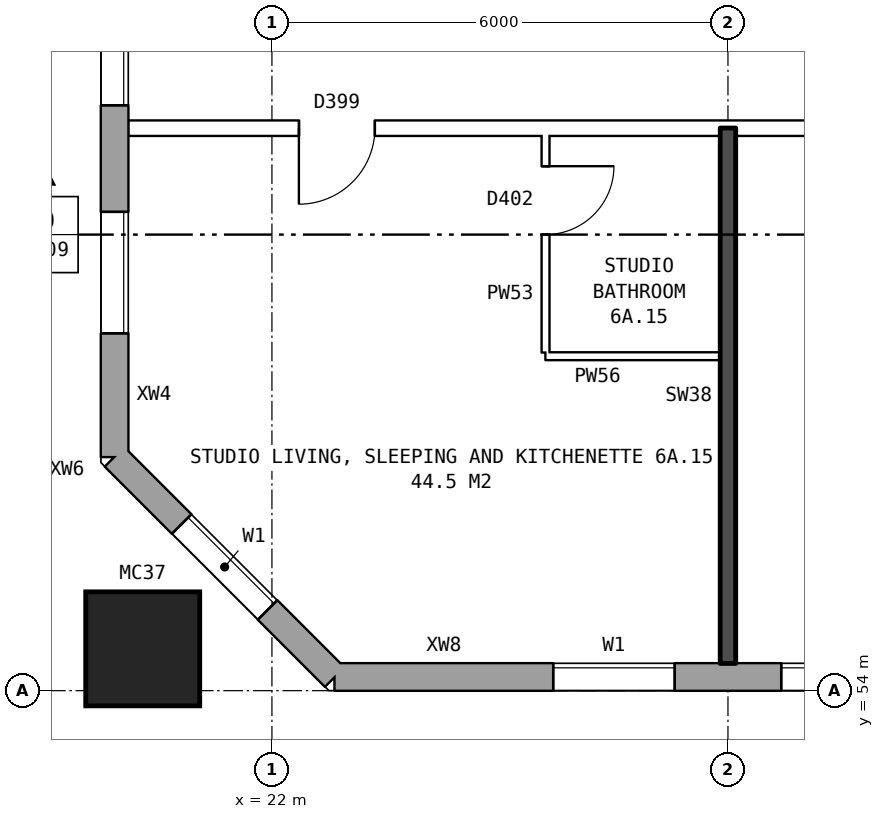
"""IFC4 building model, lengths in metres.
Left out: names, types, materials, properties, quantities, classifications, styles, units other than length and angle.
Written with IfcOpenShell. Run it as: python <this file> out.ifc"""

import sys

from ifc_helpers import new_model, si_unit, direction, frame, frame_2d, origin, origin_2d, place, context, subcontext, project, spatial, rectangle, hollow_rectangle, extrude, element, fill, save


model = new_model("IFC4")
c1 = context("Model", 3, precision=1e-05, world=origin(), true_north=direction((0.0, 1.0)))
c2 = subcontext(c1, "Body", "Model", "MODEL_VIEW")
j1 = project(units=[si_unit("LENGTHUNIT", "METRE"), si_unit("PLANEANGLEUNIT", "RADIAN")], contexts=[c1])
p1 = place(None, origin())
s1 = spatial("IfcSite", under=j1, at=p1, CompositionType="ELEMENT")
p2 = place(p1, origin())
s2 = spatial("IfcBuilding", under=s1, at=p2, CompositionType="ELEMENT")
p3 = place(p2, frame((0.0, 0.0, 25.7)))
s3 = spatial("IfcBuildingStorey", under=s2, at=p3, CompositionType="ELEMENT", Elevation=25.7)
p4 = place(p3, frame((20.3, 54.55, 0.0), z_axis=(0.0, 0.0, 1.0), x_axis=(1.0, 0.0, 0.0)))
e1 = element("IfcColumn", 1, at=p4, inside=s3, PredefinedType="COLUMN", context=c2, shape_type="SweptSolid", body=[
    extrude(hollow_rectangle(XDim=1.5, YDim=1.5, WallThickness=0.08, at=origin_2d()), origin(), (0.0, 0.0, 1.0), 3.1),
])
p5 = place(p3, frame((19.93, 57.075, 0.0), z_axis=(0.0, 0.0, 1.0), x_axis=(0.707106781187, -0.707106781187, 0.0)))
e2 = element("IfcWall", 2, at=p5, inside=s3, PredefinedType="STANDARD", context=c2, shape_type="SweptSolid", body=[
    extrude(rectangle(XDim=4.094, YDim=0.36, at=frame_2d((2.047, 0.0))), origin(), (0.0, 0.0, 1.0), 2.85),
])
p6 = place(p5, frame((1.247, 0.0, 0.8)))
e3 = element("IfcOpeningElement", 3, at=p6, cuts=e2, PredefinedType="OPENING", context=c2, shape_type="SweptSolid", body=[
    extrude(rectangle(XDim=1.6, YDim=1.8, at=frame_2d((0.8, 0.9))), frame((0.0, 0.19, 0.0), z_axis=(0.0, -1.0, 0.0), x_axis=(1.0, 0.0, 0.0)), (0.0, 0.0, 1.0), 0.38),
])
p7 = place(p3, frame((22.825, 54.18, 0.0), z_axis=(0.0, 0.0, 1.0), x_axis=(1.0, 0.0, 0.0)))
e4 = element("IfcWall", 4, at=p7, inside=s3, PredefinedType="STANDARD", context=c2, shape_type="SweptSolid", body=[
    extrude(rectangle(XDim=50.101, YDim=0.36, at=frame_2d((25.05, 0.0))), origin(), (0.0, 0.0, 1.0), 2.85),
])
p8 = place(p7, frame((2.875, 0.0, 0.8)))
e5 = element("IfcOpeningElement", 5, at=p8, cuts=e4, PredefinedType="OPENING", context=c2, shape_type="SweptSolid", body=[
    extrude(rectangle(XDim=1.6, YDim=1.8, at=frame_2d((0.8, 0.9))), frame((0.0, 0.19, 0.0), z_axis=(0.0, -1.0, 0.0), x_axis=(1.0, 0.0, 0.0)), (0.0, 0.0, 1.0), 0.38),
])
p9 = place(p7, frame((5.875, 0.0, 0.8)))
e6 = element("IfcOpeningElement", 6, at=p9, cuts=e4, PredefinedType="OPENING", context=c2, shape_type="SweptSolid", body=[
    extrude(rectangle(XDim=1.6, YDim=1.8, at=frame_2d((0.8, 0.9))), frame((0.0, 0.19, 0.0), z_axis=(0.0, -1.0, 0.0), x_axis=(1.0, 0.0, 0.0)), (0.0, 0.0, 1.0), 0.38),
])
p10 = place(p7, frame((7.775, 0.0, 1.6)))
e7 = element("IfcOpeningElement", 7, at=p10, cuts=e4, PredefinedType="OPENING", context=c2, shape_type="SweptSolid", body=[
    extrude(rectangle(XDim=0.8, YDim=0.9, at=frame_2d((0.4, 0.45))), frame((0.0, 0.19, 0.0), z_axis=(0.0, -1.0, 0.0), x_axis=(1.0, 0.0, 0.0)), (0.0, 0.0, 1.0), 0.38),
])
p11 = place(p7, frame((11.875, 0.0, 0.8)))
e8 = element("IfcOpeningElement", 8, at=p11, cuts=e4, PredefinedType="OPENING", context=c2, shape_type="SweptSolid", body=[
    extrude(rectangle(XDim=1.6, YDim=1.8, at=frame_2d((0.8, 0.9))), frame((0.0, 0.19, 0.0), z_axis=(0.0, -1.0, 0.0), x_axis=(1.0, 0.0, 0.0)), (0.0, 0.0, 1.0), 0.38),
])
p12 = place(p7, frame((14.875, 0.0, 0.8)))
e9 = element("IfcOpeningElement", 9, at=p12, cuts=e4, PredefinedType="OPENING", context=c2, shape_type="SweptSolid", body=[
    extrude(rectangle(XDim=1.6, YDim=1.8, at=frame_2d((0.8, 0.9))), frame((0.0, 0.19, 0.0), z_axis=(0.0, -1.0, 0.0), x_axis=(1.0, 0.0, 0.0)), (0.0, 0.0, 1.0), 0.38),
])
p13 = place(p7, frame((17.875, 0.0, 0.8)))
e10 = element("IfcOpeningElement", 10, at=p13, cuts=e4, PredefinedType="OPENING", context=c2, shape_type="SweptSolid", body=[
    extrude(rectangle(XDim=1.6, YDim=1.8, at=frame_2d((0.8, 0.9))), frame((0.0, 0.19, 0.0), z_axis=(0.0, -1.0, 0.0), x_axis=(1.0, 0.0, 0.0)), (0.0, 0.0, 1.0), 0.38),
])
p14 = place(p7, frame((20.875, 0.0, 0.8)))
e11 = element("IfcOpeningElement", 11, at=p14, cuts=e4, PredefinedType="OPENING", context=c2, shape_type="SweptSolid", body=[
    extrude(rectangle(XDim=1.6, YDim=1.8, at=frame_2d((0.8, 0.9))), frame((0.0, 0.19, 0.0), z_axis=(0.0, -1.0, 0.0), x_axis=(1.0, 0.0, 0.0)), (0.0, 0.0, 1.0), 0.38),
])
p15 = place(p7, frame((23.875, 0.0, 0.8)))
e12 = element("IfcOpeningElement", 12, at=p15, cuts=e4, PredefinedType="OPENING", context=c2, shape_type="SweptSolid", body=[
    extrude(rectangle(XDim=1.6, YDim=1.8, at=frame_2d((0.8, 0.9))), frame((0.0, 0.19, 0.0), z_axis=(0.0, -1.0, 0.0), x_axis=(1.0, 0.0, 0.0)), (0.0, 0.0, 1.0), 0.38),
])
p16 = place(p7, frame((26.875, 0.0, 0.8)))
e13 = element("IfcOpeningElement", 13, at=p16, cuts=e4, PredefinedType="OPENING", context=c2, shape_type="SweptSolid", body=[
    extrude(rectangle(XDim=1.6, YDim=1.8, at=frame_2d((0.8, 0.9))), frame((0.0, 0.19, 0.0), z_axis=(0.0, -1.0, 0.0), x_axis=(1.0, 0.0, 0.0)), (0.0, 0.0, 1.0), 0.38),
])
p17 = place(p7, frame((29.875, 0.0, 0.8)))
e14 = element("IfcOpeningElement", 14, at=p17, cuts=e4, PredefinedType="OPENING", context=c2, shape_type="SweptSolid", body=[
    extrude(rectangle(XDim=1.6, YDim=1.8, at=frame_2d((0.8, 0.9))), frame((0.0, 0.19, 0.0), z_axis=(0.0, -1.0, 0.0), x_axis=(1.0, 0.0, 0.0)), (0.0, 0.0, 1.0), 0.38),
])
p18 = place(p7, frame((32.875, 0.0, 0.8)))
e15 = element("IfcOpeningElement", 15, at=p18, cuts=e4, PredefinedType="OPENING", context=c2, shape_type="SweptSolid", body=[
    extrude(rectangle(XDim=1.6, YDim=1.8, at=frame_2d((0.8, 0.9))), frame((0.0, 0.19, 0.0), z_axis=(0.0, -1.0, 0.0), x_axis=(1.0, 0.0, 0.0)), (0.0, 0.0, 1.0), 0.38),
])
p19 = place(p7, frame((35.875, 0.0, 0.8)))
e16 = element("IfcOpeningElement", 16, at=p19, cuts=e4, PredefinedType="OPENING", context=c2, shape_type="SweptSolid", body=[
    extrude(rectangle(XDim=1.6, YDim=1.8, at=frame_2d((0.8, 0.9))), frame((0.0, 0.19, 0.0), z_axis=(0.0, -1.0, 0.0), x_axis=(1.0, 0.0, 0.0)), (0.0, 0.0, 1.0), 0.38),
])
p20 = place(p7, frame((38.325, 0.0, 0.15)))
e17 = element("IfcOpeningElement", 17, at=p20, cuts=e4, PredefinedType="OPENING", context=c2, shape_type="SweptSolid", body=[
    extrude(rectangle(XDim=1.2, YDim=1.8, at=frame_2d((0.6, 0.9))), frame((0.0, 0.19, 0.0), z_axis=(0.0, -1.0, 0.0), x_axis=(1.0, 0.0, 0.0)), (0.0, 0.0, 1.0), 0.38),
])
p21 = place(p7, frame((41.825, 0.0, 1.4)))
e18 = element("IfcOpeningElement", 18, at=p21, cuts=e4, PredefinedType="OPENING", context=c2, shape_type="SweptSolid", body=[
    extrude(rectangle(XDim=1.0, YDim=1.2, at=frame_2d((0.5, 0.6))), frame((0.0, 0.19, 0.0), z_axis=(0.0, -1.0, 0.0), x_axis=(1.0, 0.0, 0.0)), (0.0, 0.0, 1.0), 0.38),
])
p22 = place(p7, frame((44.875, 0.0, 0.8)))
e19 = element("IfcOpeningElement", 19, at=p22, cuts=e4, PredefinedType="OPENING", context=c2, shape_type="SweptSolid", body=[
    extrude(rectangle(XDim=1.6, YDim=1.8, at=frame_2d((0.8, 0.9))), frame((0.0, 0.19, 0.0), z_axis=(0.0, -1.0, 0.0), x_axis=(1.0, 0.0, 0.0)), (0.0, 0.0, 1.0), 0.38),
])
p23 = place(p7, frame((47.875, 0.0, 0.8)))
e20 = element("IfcOpeningElement", 20, at=p23, cuts=e4, PredefinedType="OPENING", context=c2, shape_type="SweptSolid", body=[
    extrude(rectangle(XDim=1.6, YDim=1.8, at=frame_2d((0.8, 0.9))), frame((0.0, 0.19, 0.0), z_axis=(0.0, -1.0, 0.0), x_axis=(1.0, 0.0, 0.0)), (0.0, 0.0, 1.0), 0.38),
])
p24 = place(p7, frame((10.175, 0.0, 0.8)))
e21 = element("IfcOpeningElement", 21, at=p24, cuts=e4, PredefinedType="OPENING", context=c2, shape_type="SweptSolid", body=[
    extrude(rectangle(XDim=0.8, YDim=0.9, at=frame_2d((0.4, 0.45))), frame((0.0, 0.19, 0.0), z_axis=(0.0, -1.0, 0.0), x_axis=(1.0, 0.0, 0.0)), (0.0, 0.0, 1.0), 0.38),
])
p25 = place(p7, frame((39.825, 0.0, 0.15)))
e22 = element("IfcOpeningElement", 22, at=p25, cuts=e4, PredefinedType="OPENING", context=c2, shape_type="SweptSolid", body=[
    extrude(rectangle(XDim=1.0, YDim=0.9, at=frame_2d((0.5, 0.45))), frame((0.0, 0.19, 0.0), z_axis=(0.0, -1.0, 0.0), x_axis=(1.0, 0.0, 0.0)), (0.0, 0.0, 1.0), 0.38),
])
p26 = place(p7, frame((43.125, 0.0, 0.8)))
e23 = element("IfcOpeningElement", 23, at=p26, cuts=e4, PredefinedType="OPENING", context=c2, shape_type="SweptSolid", body=[
    extrude(rectangle(XDim=1.4, YDim=1.8, at=frame_2d((0.7, 0.9))), frame((0.0, 0.19, 0.0), z_axis=(0.0, -1.0, 0.0), x_axis=(1.0, 0.0, 0.0)), (0.0, 0.0, 1.0), 0.38),
])
p27 = place(p3, frame((19.93, 82.925, 0.0), z_axis=(0.0, 0.0, 1.0), x_axis=(0.0, -1.0, 0.0)))
e24 = element("IfcWall", 24, at=p27, inside=s3, PredefinedType="STANDARD", context=c2, shape_type="SweptSolid", body=[
    extrude(rectangle(XDim=25.851, YDim=0.36, at=frame_2d((12.925, 0.0))), origin(), (0.0, 0.0, 1.0), 2.85),
])
p28 = place(p27, frame((1.625, 0.0, 0.8)))
e25 = element("IfcOpeningElement", 25, at=p28, cuts=e24, PredefinedType="OPENING", context=c2, shape_type="SweptSolid", body=[
    extrude(rectangle(XDim=1.6, YDim=1.8, at=frame_2d((0.8, 0.9))), frame((0.0, 0.19, 0.0), z_axis=(0.0, -1.0, 0.0), x_axis=(1.0, 0.0, 0.0)), (0.0, 0.0, 1.0), 0.38),
])
p29 = place(p27, frame((4.625, 0.0, 0.8)))
e26 = element("IfcOpeningElement", 26, at=p29, cuts=e24, PredefinedType="OPENING", context=c2, shape_type="SweptSolid", body=[
    extrude(rectangle(XDim=1.6, YDim=1.8, at=frame_2d((0.8, 0.9))), frame((0.0, 0.19, 0.0), z_axis=(0.0, -1.0, 0.0), x_axis=(1.0, 0.0, 0.0)), (0.0, 0.0, 1.0), 0.38),
])
p30 = place(p27, frame((6.525, 0.0, 0.8)))
e27 = element("IfcOpeningElement", 27, at=p30, cuts=e24, PredefinedType="OPENING", context=c2, shape_type="SweptSolid", body=[
    extrude(rectangle(XDim=1.6, YDim=1.8, at=frame_2d((0.8, 0.9))), frame((0.0, 0.19, 0.0), z_axis=(0.0, -1.0, 0.0), x_axis=(1.0, 0.0, 0.0)), (0.0, 0.0, 1.0), 0.38),
])
p31 = place(p27, frame((8.425, 0.0, 1.1)))
e28 = element("IfcOpeningElement", 28, at=p31, cuts=e24, PredefinedType="OPENING", context=c2, shape_type="SweptSolid", body=[
    extrude(rectangle(XDim=0.8, YDim=1.5, at=frame_2d((0.4, 0.75))), frame((0.0, 0.19, 0.0), z_axis=(0.0, -1.0, 0.0), x_axis=(1.0, 0.0, 0.0)), (0.0, 0.0, 1.0), 0.38),
])
p32 = place(p27, frame((9.525, 0.0, 1.6)))
e29 = element("IfcOpeningElement", 29, at=p32, cuts=e24, PredefinedType="OPENING", context=c2, shape_type="SweptSolid", body=[
    extrude(rectangle(XDim=0.6, YDim=0.9, at=frame_2d((0.3, 0.45))), frame((0.0, 0.19, 0.0), z_axis=(0.0, -1.0, 0.0), x_axis=(1.0, 0.0, 0.0)), (0.0, 0.0, 1.0), 0.38),
])
p33 = place(p27, frame((11.525, 0.0, 0.8)))
e30 = element("IfcOpeningElement", 30, at=p33, cuts=e24, PredefinedType="OPENING", context=c2, shape_type="SweptSolid", body=[
    extrude(rectangle(XDim=0.6, YDim=0.9, at=frame_2d((0.3, 0.45))), frame((0.0, 0.19, 0.0), z_axis=(0.0, -1.0, 0.0), x_axis=(1.0, 0.0, 0.0)), (0.0, 0.0, 1.0), 0.38),
])
p34 = place(p27, frame((19.625, 0.0, 0.8)))
e31 = element("IfcOpeningElement", 31, at=p34, cuts=e24, PredefinedType="OPENING", context=c2, shape_type="SweptSolid", body=[
    extrude(rectangle(XDim=1.6, YDim=1.8, at=frame_2d((0.8, 0.9))), frame((0.0, 0.19, 0.0), z_axis=(0.0, -1.0, 0.0), x_axis=(1.0, 0.0, 0.0)), (0.0, 0.0, 1.0), 0.38),
])
p35 = place(p27, frame((22.625, 0.0, 0.8)))
e32 = element("IfcOpeningElement", 32, at=p35, cuts=e24, PredefinedType="OPENING", context=c2, shape_type="SweptSolid", body=[
    extrude(rectangle(XDim=1.6, YDim=1.8, at=frame_2d((0.8, 0.9))), frame((0.0, 0.19, 0.0), z_axis=(0.0, -1.0, 0.0), x_axis=(1.0, 0.0, 0.0)), (0.0, 0.0, 1.0), 0.38),
])
p36 = place(p27, frame((12.425, 0.0, 0.8)))
e33 = element("IfcOpeningElement", 33, at=p36, cuts=e24, PredefinedType="OPENING", context=c2, shape_type="SweptSolid", body=[
    extrude(rectangle(XDim=1.0, YDim=1.8, at=frame_2d((0.5, 0.9))), frame((0.0, 0.19, 0.0), z_axis=(0.0, -1.0, 0.0), x_axis=(1.0, 0.0, 0.0)), (0.0, 0.0, 1.0), 0.38),
])
p37 = place(p27, frame((13.725, 0.0, 0.8)))
e34 = element("IfcOpeningElement", 34, at=p37, cuts=e24, PredefinedType="OPENING", context=c2, shape_type="SweptSolid", body=[
    extrude(rectangle(XDim=0.6, YDim=0.9, at=frame_2d((0.3, 0.45))), frame((0.0, 0.19, 0.0), z_axis=(0.0, -1.0, 0.0), x_axis=(1.0, 0.0, 0.0)), (0.0, 0.0, 1.0), 0.38),
])
p38 = place(p27, frame((15.575, 0.0, 1.7)))
e35 = element("IfcOpeningElement", 35, at=p38, cuts=e24, PredefinedType="OPENING", context=c2, shape_type="SweptSolid", body=[
    extrude(rectangle(XDim=0.6, YDim=0.9, at=frame_2d((0.3, 0.45))), frame((0.0, 0.19, 0.0), z_axis=(0.0, -1.0, 0.0), x_axis=(1.0, 0.0, 0.0)), (0.0, 0.0, 1.0), 0.38),
])
p39 = place(p27, frame((16.575, 0.0, 1.1)))
e36 = element("IfcOpeningElement", 36, at=p39, cuts=e24, PredefinedType="OPENING", context=c2, shape_type="SweptSolid", body=[
    extrude(rectangle(XDim=0.8, YDim=1.5, at=frame_2d((0.4, 0.75))), frame((0.0, 0.19, 0.0), z_axis=(0.0, -1.0, 0.0), x_axis=(1.0, 0.0, 0.0)), (0.0, 0.0, 1.0), 0.38),
])
p40 = place(p27, frame((17.675, 0.0, 0.8)))
e37 = element("IfcOpeningElement", 37, at=p40, cuts=e24, PredefinedType="OPENING", context=c2, shape_type="SweptSolid", body=[
    extrude(rectangle(XDim=1.6, YDim=1.8, at=frame_2d((0.8, 0.9))), frame((0.0, 0.19, 0.0), z_axis=(0.0, -1.0, 0.0), x_axis=(1.0, 0.0, 0.0)), (0.0, 0.0, 1.0), 0.38),
])
p41 = place(p3, frame((25.6, 58.4, 0.0), z_axis=(0.0, 0.0, 1.0), x_axis=(1.0, 0.0, 0.0)))
e38 = element("IfcWall", 38, at=p41, inside=s3, PredefinedType="PARTITIONING", context=c2, shape_type="SweptSolid", body=[
    extrude(rectangle(XDim=2.3, YDim=0.1, at=frame_2d((1.15, 0.0))), origin(), (0.0, 0.0, 1.0), 2.85),
])
p42 = place(p3, frame((20.11, 61.4, 0.0), z_axis=(0.0, 0.0, 1.0), x_axis=(1.0, 0.0, 0.0)))
e39 = element("IfcWall", 39, at=p42, inside=s3, PredefinedType="PARTITIONING", context=c2, shape_type="SweptSolid", body=[
    extrude(rectangle(XDim=25.79, YDim=0.2, at=frame_2d((12.895, 0.0))), origin(), (0.0, 0.0, 1.0), 2.85),
])
p43 = place(p42, frame((22.34, 0.0, 0.0)))
e40 = element("IfcOpeningElement", 40, at=p43, cuts=e39, PredefinedType="OPENING", context=c2, shape_type="SweptSolid", body=[
    extrude(rectangle(XDim=1.0, YDim=2.1, at=frame_2d((0.5, 1.05))), frame((0.0, 0.11, 0.0), z_axis=(0.0, -1.0, 0.0), x_axis=(1.0, 0.0, 0.0)), (0.0, 0.0, 1.0), 0.22),
])
p44 = place(p42, frame((10.39, 0.0, 0.0)))
e41 = element("IfcOpeningElement", 41, at=p44, cuts=e39, PredefinedType="OPENING", context=c2, shape_type="SweptSolid", body=[
    extrude(rectangle(XDim=1.0, YDim=2.1, at=frame_2d((0.5, 1.05))), frame((0.0, 0.11, 0.0), z_axis=(0.0, -1.0, 0.0), x_axis=(1.0, 0.0, 0.0)), (0.0, 0.0, 1.0), 0.22),
])
p45 = place(p42, frame((2.245, 0.0, 0.0)))
e42 = element("IfcOpeningElement", 42, at=p45, cuts=e39, PredefinedType="OPENING", context=c2, shape_type="SweptSolid", body=[
    extrude(rectangle(XDim=1.0, YDim=2.1, at=frame_2d((0.5, 1.05))), frame((0.0, 0.11, 0.0), z_axis=(0.0, -1.0, 0.0), x_axis=(1.0, 0.0, 0.0)), (0.0, 0.0, 1.0), 0.22),
])
p46 = place(p3, frame((25.6, 58.45, 0.0), z_axis=(0.0, 0.0, 1.0), x_axis=(0.0, 1.0, 0.0)))
e43 = element("IfcWall", 43, at=p46, inside=s3, PredefinedType="PARTITIONING", context=c2, shape_type="SweptSolid", body=[
    extrude(rectangle(XDim=2.85, YDim=0.1, at=frame_2d((1.425, 0.0))), origin(), (0.0, 0.0, 1.0), 2.85),
])
p47 = place(p46, frame((1.55, 0.0, 0.0)))
e44 = element("IfcOpeningElement", 44, at=p47, cuts=e43, PredefinedType="OPENING", context=c2, shape_type="SweptSolid", body=[
    extrude(rectangle(XDim=0.9, YDim=2.1, at=frame_2d((0.45, 1.05))), frame((0.0, 0.06, 0.0), z_axis=(0.0, -1.0, 0.0), x_axis=(1.0, 0.0, 0.0)), (0.0, 0.0, 1.0), 0.12),
])
p48 = place(p3, frame((28.0, 54.36, 0.0), z_axis=(0.0, 0.0, 1.0), x_axis=(0.0, 1.0, 0.0)))
e45 = element("IfcWall", 45, at=p48, inside=s3, PredefinedType="SOLIDWALL", context=c2, shape_type="SweptSolid", body=[
    extrude(rectangle(XDim=7.04, YDim=0.2, at=frame_2d((3.52, 0.0))), origin(), (0.0, 0.0, 1.0), 2.85),
])
p49 = place(p6, origin())
e46 = element("IfcWindow", 46, at=p49, inside=s3, PartitioningType="SINGLE_PANEL", PredefinedType="WINDOW", context=c2, shape_type="SweptSolid", body=[
    extrude(rectangle(XDim=1.6, YDim=1.8, at=frame_2d((0.8, 0.9))), frame((0.0, 0.15, 0.0), z_axis=(0.0, -1.0, 0.0), x_axis=(1.0, 0.0, 0.0)), (0.0, 0.0, 1.0), 0.06),
])
fill(e3, e46)
p50 = place(p8, origin())
e47 = element("IfcWindow", 47, at=p50, inside=s3, PartitioningType="SINGLE_PANEL", PredefinedType="WINDOW", context=c2, shape_type="SweptSolid", body=[
    extrude(rectangle(XDim=1.6, YDim=1.8, at=frame_2d((0.8, 0.9))), frame((0.0, 0.15, 0.0), z_axis=(0.0, -1.0, 0.0), x_axis=(1.0, 0.0, 0.0)), (0.0, 0.0, 1.0), 0.06),
])
fill(e5, e47)
p51 = place(p9, origin())
e48 = element("IfcWindow", 48, at=p51, inside=s3, PartitioningType="SINGLE_PANEL", PredefinedType="WINDOW", context=c2, shape_type="SweptSolid", body=[
    extrude(rectangle(XDim=1.6, YDim=1.8, at=frame_2d((0.8, 0.9))), frame((0.0, 0.15, 0.0), z_axis=(0.0, -1.0, 0.0), x_axis=(1.0, 0.0, 0.0)), (0.0, 0.0, 1.0), 0.06),
])
fill(e6, e48)
p52 = place(p34, origin())
e49 = element("IfcWindow", 49, at=p52, inside=s3, PartitioningType="SINGLE_PANEL", PredefinedType="WINDOW", context=c2, shape_type="SweptSolid", body=[
    extrude(rectangle(XDim=1.6, YDim=1.8, at=frame_2d((0.8, 0.9))), frame((0.0, 0.15, 0.0), z_axis=(0.0, -1.0, 0.0), x_axis=(1.0, 0.0, 0.0)), (0.0, 0.0, 1.0), 0.06),
])
fill(e31, e49)
p53 = place(p35, origin())
e50 = element("IfcWindow", 50, at=p53, inside=s3, PartitioningType="SINGLE_PANEL", PredefinedType="WINDOW", context=c2, shape_type="SweptSolid", body=[
    extrude(rectangle(XDim=1.6, YDim=1.8, at=frame_2d((0.8, 0.9))), frame((0.0, 0.15, 0.0), z_axis=(0.0, -1.0, 0.0), x_axis=(1.0, 0.0, 0.0)), (0.0, 0.0, 1.0), 0.06),
])
fill(e32, e50)
p54 = place(p45, frame((1.0, 0.0, 0.0), z_axis=(0.0, 0.0, 1.0), x_axis=(-1.0, 0.0, 0.0)))
e51 = element("IfcDoor", 51, at=p54, inside=s3, OperationType="SINGLE_SWING_RIGHT", PredefinedType="DOOR", context=c2, shape_type="SweptSolid", body=[
    extrude(rectangle(XDim=1.0, YDim=2.1, at=frame_2d((0.5, 1.05))), frame((0.0, 0.025, 0.0), z_axis=(0.0, -1.0, 0.0), x_axis=(1.0, 0.0, 0.0)), (0.0, 0.0, 1.0), 0.05),
])
fill(e42, e51)
p55 = place(p47, frame((0.9, 0.0, 0.0), z_axis=(0.0, 0.0, 1.0), x_axis=(-1.0, 0.0, 0.0)))
e52 = element("IfcDoor", 52, at=p55, inside=s3, OperationType="SINGLE_SWING_LEFT", PredefinedType="DOOR", context=c2, shape_type="SweptSolid", body=[
    extrude(rectangle(XDim=0.9, YDim=2.1, at=frame_2d((0.45, 1.05))), frame((0.0, 0.025, 0.0), z_axis=(0.0, -1.0, 0.0), x_axis=(1.0, 0.0, 0.0)), (0.0, 0.0, 1.0), 0.05),
])
fill(e44, e52)
save(model, sys.argv[1])
